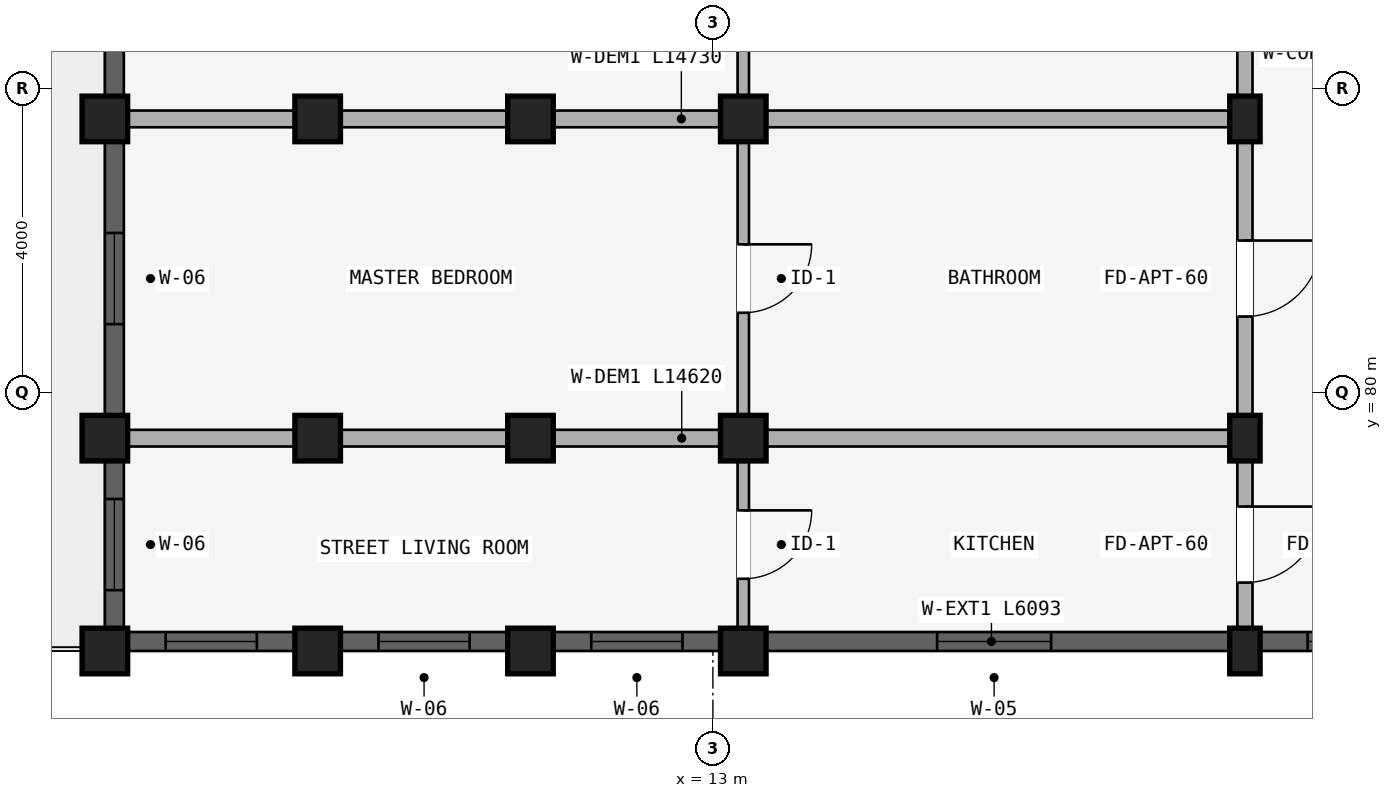
"""IFC4 building model, lengths in metres.
Left out: names, types, materials, properties, quantities, classifications, styles, units other than length and angle.
Written with IfcOpenShell. Run it as: python <this file> out.ifc"""

import sys

from ifc_helpers import new_model, si_unit, direction, frame, frame_2d, origin, origin_2d, place, context, subcontext, project, spatial, rectangle, extrude, element, fill, save


model = new_model("IFC4")
c1 = context("Model", 3, precision=1e-05, world=origin(), true_north=direction((0.0, 1.0)))
c2 = subcontext(c1, "Body", "Model", "MODEL_VIEW")
j1 = project(units=[si_unit("LENGTHUNIT", "METRE"), si_unit("PLANEANGLEUNIT", "RADIAN")], contexts=[c1])
p1 = place(None, origin())
s1 = spatial("IfcSite", under=j1, at=p1, CompositionType="ELEMENT")
p2 = place(p1, origin())
s2 = spatial("IfcBuilding", under=s1, at=p2, CompositionType="ELEMENT")
p3 = place(p2, frame((0.0, 0.0, 40.2)))
s3 = spatial("IfcBuildingStorey", under=s2, at=p3, CompositionType="ELEMENT", Elevation=40.2)
p4 = place(p3, frame((20.0, 83.6, 0.0), z_axis=(0.0, 0.0, 1.0), x_axis=(1.0, 0.0, 0.0)))
e1 = element("IfcColumn", 1, at=p4, inside=s3, PredefinedType="COLUMN", context=c2, shape_type="SweptSolid", body=[
    extrude(rectangle(XDim=0.4, YDim=0.6, at=origin_2d()), origin(), (0.0, 0.0, 1.0), 2.93),
])
for number, where, z_axis, x_axis in (
    (2, (13.4, 83.6, 0.0), (0.0, 0.0, 1.0), (1.0, 0.0, 0.0)),
    (3, (10.6, 83.6, 0.0), (0.0, 0.0, 1.0), (1.0, 0.0, 0.0)),
    (4, (7.8, 83.6, 0.0), (0.0, 0.0, 1.0), (1.0, 0.0, 0.0)),
):
    element("IfcColumn", number, at=place(p3, frame(where, z_axis=z_axis, x_axis=x_axis)), inside=s3, PredefinedType="COLUMN", context=c2, shape_type="SweptSolid", body=[
        extrude(rectangle(XDim=0.6, YDim=0.6, at=origin_2d()), origin(), (0.0, 0.0, 1.0), 2.93),
    ])
p5 = place(p3, frame((5.0, 83.6, 0.0), z_axis=(0.0, 0.0, 1.0), x_axis=(1.0, 0.0, 0.0)))
e5 = element("IfcColumn", 5, at=p5, inside=s3, PredefinedType="COLUMN", context=c2, shape_type="SweptSolid", body=[
    extrude(rectangle(XDim=0.6, YDim=0.6, at=origin_2d()), origin(), (0.0, 0.0, 1.0), 2.97),
])
p6 = place(p3, frame((20.0, 79.4, 0.0), z_axis=(0.0, 0.0, 1.0), x_axis=(1.0, 0.0, 0.0)))
e6 = element("IfcColumn", 6, at=p6, inside=s3, PredefinedType="COLUMN", context=c2, shape_type="SweptSolid", body=[
    extrude(rectangle(XDim=0.4, YDim=0.6, at=origin_2d()), origin(), (0.0, 0.0, 1.0), 2.93),
])
for number, where, z_axis, x_axis in (
    (7, (13.4, 79.4, 0.0), (0.0, 0.0, 1.0), (1.0, 0.0, 0.0)),
    (8, (10.6, 79.4, 0.0), (0.0, 0.0, 1.0), (1.0, 0.0, 0.0)),
    (9, (7.8, 79.4, 0.0), (0.0, 0.0, 1.0), (1.0, 0.0, 0.0)),
):
    element("IfcColumn", number, at=place(p3, frame(where, z_axis=z_axis, x_axis=x_axis)), inside=s3, PredefinedType="COLUMN", context=c2, shape_type="SweptSolid", body=[
        extrude(rectangle(XDim=0.6, YDim=0.6, at=origin_2d()), origin(), (0.0, 0.0, 1.0), 2.93),
    ])
p7 = place(p3, frame((5.0, 79.4, 0.0), z_axis=(0.0, 0.0, 1.0), x_axis=(1.0, 0.0, 0.0)))
e10 = element("IfcColumn", 10, at=p7, inside=s3, PredefinedType="COLUMN", context=c2, shape_type="SweptSolid", body=[
    extrude(rectangle(XDim=0.6, YDim=0.6, at=origin_2d()), origin(), (0.0, 0.0, 1.0), 2.97),
])
p8 = place(p3, frame((20.0, 76.6, 0.0), z_axis=(0.0, 0.0, 1.0), x_axis=(1.0, 0.0, 0.0)))
e11 = element("IfcColumn", 11, at=p8, inside=s3, PredefinedType="COLUMN", context=c2, shape_type="SweptSolid", body=[
    extrude(rectangle(XDim=0.4, YDim=0.6, at=origin_2d()), origin(), (0.0, 0.0, 1.0), 2.93),
])
for number, where, z_axis, x_axis in (
    (12, (13.4, 76.6, 0.0), (0.0, 0.0, 1.0), (1.0, 0.0, 0.0)),
    (13, (10.6, 76.6, 0.0), (0.0, 0.0, 1.0), (1.0, 0.0, 0.0)),
    (14, (7.8, 76.6, 0.0), (0.0, 0.0, 1.0), (1.0, 0.0, 0.0)),
):
    element("IfcColumn", number, at=place(p3, frame(where, z_axis=z_axis, x_axis=x_axis)), inside=s3, PredefinedType="COLUMN", context=c2, shape_type="SweptSolid", body=[
        extrude(rectangle(XDim=0.6, YDim=0.6, at=origin_2d()), origin(), (0.0, 0.0, 1.0), 2.93),
    ])
p9 = place(p3, frame((5.0, 76.6, 0.0), z_axis=(0.0, 0.0, 1.0), x_axis=(1.0, 0.0, 0.0)))
e15 = element("IfcColumn", 15, at=p9, inside=s3, PredefinedType="COLUMN", context=c2, shape_type="SweptSolid", body=[
    extrude(rectangle(XDim=0.6, YDim=0.6, at=origin_2d()), origin(), (0.0, 0.0, 1.0), 2.97),
])
p10 = place(p3, frame((20.0, 87.65, 0.0), z_axis=(0.0, 0.0, 1.0), x_axis=(0.0, -1.0, 0.0)))
e16 = element("IfcWall", 16, at=p10, inside=s3, PredefinedType="STANDARD", context=c2, shape_type="SweptSolid", body=[
    extrude(rectangle(XDim=4.05, YDim=0.2, at=frame_2d((2.025, 0.0))), origin(), (0.0, 0.0, 1.0), 2.372),
])
p11 = place(p10, frame((1.525, 0.0, 0.0)))
e17 = element("IfcOpeningElement", 17, at=p11, cuts=e16, PredefinedType="OPENING", context=c2, shape_type="SweptSolid", body=[
    extrude(rectangle(XDim=1.0, YDim=2.15, at=frame_2d((0.5, 1.075))), frame((0.0, 0.11, 0.0), z_axis=(0.0, -1.0, 0.0), x_axis=(1.0, 0.0, 0.0)), (0.0, 0.0, 1.0), 0.22),
])
p12 = place(p3, frame((13.4, 87.57, 0.0), z_axis=(0.0, 0.0, 1.0), x_axis=(0.0, -1.0, 0.0)))
e18 = element("IfcWall", 18, at=p12, inside=s3, PredefinedType="PARTITIONING", context=c2, shape_type="SweptSolid", body=[
    extrude(rectangle(XDim=3.89, YDim=0.15, at=frame_2d((1.945, 0.0))), origin(), (0.0, 0.0, 1.0), 2.372),
])
p13 = place(p12, frame((1.495, 0.0, 0.0)))
e19 = element("IfcOpeningElement", 19, at=p13, cuts=e18, PredefinedType="OPENING", context=c2, shape_type="SweptSolid", body=[
    extrude(rectangle(XDim=0.9, YDim=2.1, at=frame_2d((0.45, 1.05))), frame((0.0, 0.085, 0.0), z_axis=(0.0, -1.0, 0.0), x_axis=(1.0, 0.0, 0.0)), (0.0, 0.0, 1.0), 0.17),
])
p14 = place(p3, frame((20.0, 83.6, 0.0), z_axis=(0.0, 0.0, 1.0), x_axis=(0.0, -1.0, 0.0)))
e20 = element("IfcWall", 20, at=p14, inside=s3, PredefinedType="STANDARD", context=c2, shape_type="SweptSolid", body=[
    extrude(rectangle(XDim=4.2, YDim=0.2, at=frame_2d((2.1, 0.0))), origin(), (0.0, 0.0, 1.0), 2.372),
])
p15 = place(p14, frame((1.6, 0.0, 0.0)))
e21 = element("IfcOpeningElement", 21, at=p15, cuts=e20, PredefinedType="OPENING", context=c2, shape_type="SweptSolid", body=[
    extrude(rectangle(XDim=1.0, YDim=2.15, at=frame_2d((0.5, 1.075))), frame((0.0, 0.11, 0.0), z_axis=(0.0, -1.0, 0.0), x_axis=(1.0, 0.0, 0.0)), (0.0, 0.0, 1.0), 0.22),
])
p16 = place(p3, frame((13.4, 83.52, 0.0), z_axis=(0.0, 0.0, 1.0), x_axis=(0.0, -1.0, 0.0)))
e22 = element("IfcWall", 22, at=p16, inside=s3, PredefinedType="PARTITIONING", context=c2, shape_type="SweptSolid", body=[
    extrude(rectangle(XDim=4.04, YDim=0.15, at=frame_2d((2.02, 0.0))), origin(), (0.0, 0.0, 1.0), 2.372),
])
p17 = place(p16, frame((1.57, 0.0, 0.0)))
e23 = element("IfcOpeningElement", 23, at=p17, cuts=e22, PredefinedType="OPENING", context=c2, shape_type="SweptSolid", body=[
    extrude(rectangle(XDim=0.9, YDim=2.1, at=frame_2d((0.45, 1.05))), frame((0.0, 0.085, 0.0), z_axis=(0.0, -1.0, 0.0), x_axis=(1.0, 0.0, 0.0)), (0.0, 0.0, 1.0), 0.17),
])
p18 = place(p3, frame((19.95, 83.6, 0.0), z_axis=(0.0, 0.0, 1.0), x_axis=(-1.0, 0.0, 0.0)))
e24 = element("IfcWall", 24, at=p18, inside=s3, PredefinedType="STANDARD", context=c2, shape_type="SweptSolid", body=[
    extrude(rectangle(XDim=14.73, YDim=0.22, at=frame_2d((7.365, 0.0))), origin(), (0.0, 0.0, 1.0), 2.372),
])
p19 = place(p3, frame((20.0, 79.4, 0.0), z_axis=(0.0, 0.0, 1.0), x_axis=(0.0, -1.0, 0.0)))
e25 = element("IfcWall", 25, at=p19, inside=s3, PredefinedType="STANDARD", context=c2, shape_type="SweptSolid", body=[
    extrude(rectangle(XDim=2.8, YDim=0.2, at=frame_2d((1.4, 0.0))), origin(), (0.0, 0.0, 1.0), 2.372),
])
p20 = place(p19, frame((0.9, 0.0, 0.0)))
e26 = element("IfcOpeningElement", 26, at=p20, cuts=e25, PredefinedType="OPENING", context=c2, shape_type="SweptSolid", body=[
    extrude(rectangle(XDim=1.0, YDim=2.15, at=frame_2d((0.5, 1.075))), frame((0.0, 0.11, 0.0), z_axis=(0.0, -1.0, 0.0), x_axis=(1.0, 0.0, 0.0)), (0.0, 0.0, 1.0), 0.22),
])
p21 = place(p3, frame((13.4, 79.32, 0.0), z_axis=(0.0, 0.0, 1.0), x_axis=(0.0, -1.0, 0.0)))
e27 = element("IfcWall", 27, at=p21, inside=s3, PredefinedType="PLUMBINGWALL", context=c2, shape_type="SweptSolid", body=[
    extrude(rectangle(XDim=2.64, YDim=0.15, at=frame_2d((1.32, 0.0))), origin(), (0.0, 0.0, 1.0), 2.372),
])
p22 = place(p21, frame((0.87, 0.0, 0.0)))
e28 = element("IfcOpeningElement", 28, at=p22, cuts=e27, PredefinedType="OPENING", context=c2, shape_type="SweptSolid", body=[
    extrude(rectangle(XDim=0.9, YDim=2.1, at=frame_2d((0.45, 1.05))), frame((0.0, 0.085, 0.0), z_axis=(0.0, -1.0, 0.0), x_axis=(1.0, 0.0, 0.0)), (0.0, 0.0, 1.0), 0.17),
])
p23 = place(p3, frame((19.9, 79.4, 0.0), z_axis=(0.0, 0.0, 1.0), x_axis=(-1.0, 0.0, 0.0)))
e29 = element("IfcWall", 29, at=p23, inside=s3, PredefinedType="STANDARD", context=c2, shape_type="SweptSolid", body=[
    extrude(rectangle(XDim=14.62, YDim=0.22, at=frame_2d((7.31, 0.0))), origin(), (0.0, 0.0, 1.0), 2.372),
])
p24 = place(p3, frame((5.125, 87.497, 0.0), z_axis=(0.0, 0.0, 1.0), x_axis=(0.0, -1.0, 0.0)))
e30 = element("IfcWall", 30, at=p24, inside=s3, PredefinedType="STANDARD", context=c2, shape_type="SweptSolid", body=[
    extrude(rectangle(XDim=3.593, YDim=0.25, at=frame_2d((1.796, 0.0))), origin(), (0.0, 0.0, 1.0), 2.48),
])
p25 = place(p24, frame((1.197, 0.0, 0.78)))
e31 = element("IfcOpeningElement", 31, at=p25, cuts=e30, PredefinedType="OPENING", context=c2, shape_type="SweptSolid", body=[
    extrude(rectangle(XDim=1.2, YDim=1.5, at=frame_2d((0.6, 0.75))), frame((0.0, 0.135, 0.0), z_axis=(0.0, -1.0, 0.0), x_axis=(1.0, 0.0, 0.0)), (0.0, 0.0, 1.0), 0.27),
])
p26 = place(p3, frame((5.125, 83.296, 0.0), z_axis=(0.0, 0.0, 1.0), x_axis=(0.0, -1.0, 0.0)))
e32 = element("IfcWall", 32, at=p26, inside=s3, PredefinedType="STANDARD", context=c2, shape_type="SweptSolid", body=[
    extrude(rectangle(XDim=3.593, YDim=0.25, at=frame_2d((1.796, 0.0))), origin(), (0.0, 0.0, 1.0), 2.48),
])
p27 = place(p26, frame((1.197, 0.0, 0.78)))
e33 = element("IfcOpeningElement", 33, at=p27, cuts=e32, PredefinedType="OPENING", context=c2, shape_type="SweptSolid", body=[
    extrude(rectangle(XDim=1.2, YDim=1.5, at=frame_2d((0.6, 0.75))), frame((0.0, 0.135, 0.0), z_axis=(0.0, -1.0, 0.0), x_axis=(1.0, 0.0, 0.0)), (0.0, 0.0, 1.0), 0.27),
])
p28 = place(p3, frame((5.125, 79.096, 0.0), z_axis=(0.0, 0.0, 1.0), x_axis=(0.0, -1.0, 0.0)))
e34 = element("IfcWall", 34, at=p28, inside=s3, PredefinedType="STANDARD", context=c2, shape_type="SweptSolid", body=[
    extrude(rectangle(XDim=2.193, YDim=0.25, at=frame_2d((1.096, 0.0))), origin(), (0.0, 0.0, 1.0), 2.48),
])
p29 = place(p28, frame((0.497, 0.0, 0.78)))
e35 = element("IfcOpeningElement", 35, at=p29, cuts=e34, PredefinedType="OPENING", context=c2, shape_type="SweptSolid", body=[
    extrude(rectangle(XDim=1.2, YDim=1.5, at=frame_2d((0.6, 0.75))), frame((0.0, 0.135, 0.0), z_axis=(0.0, -1.0, 0.0), x_axis=(1.0, 0.0, 0.0)), (0.0, 0.0, 1.0), 0.27),
])
p30 = place(p3, frame((22.197, 76.725, 0.0), z_axis=(0.0, 0.0, 1.0), x_axis=(-1.0, 0.0, 0.0)))
e36 = element("IfcWall", 36, at=p30, inside=s3, PredefinedType="STANDARD", context=c2, shape_type="SweptSolid", body=[
    extrude(rectangle(XDim=1.993, YDim=0.25, at=frame_2d((0.997, 0.0))), origin(), (0.0, 0.0, 1.0), 2.372),
])
p31 = place(p30, frame((0.622, 0.0, 0.88)))
e37 = element("IfcOpeningElement", 37, at=p31, cuts=e36, PredefinedType="OPENING", context=c2, shape_type="SweptSolid", body=[
    extrude(rectangle(XDim=0.75, YDim=1.05, at=frame_2d((0.375, 0.525))), frame((0.0, 0.135, 0.0), z_axis=(0.0, -1.0, 0.0), x_axis=(1.0, 0.0, 0.0)), (0.0, 0.0, 1.0), 0.27),
])
p32 = place(p3, frame((19.796, 76.725, 0.0), z_axis=(0.0, 0.0, 1.0), x_axis=(-1.0, 0.0, 0.0)))
e38 = element("IfcWall", 38, at=p32, inside=s3, PredefinedType="STANDARD", context=c2, shape_type="SweptSolid", body=[
    extrude(rectangle(XDim=6.093, YDim=0.25, at=frame_2d((3.046, 0.0))), origin(), (0.0, 0.0, 1.0), 2.372),
])
p33 = place(p32, frame((2.346, 0.0, 0.522)))
e39 = element("IfcOpeningElement", 39, at=p33, cuts=e38, PredefinedType="OPENING", context=c2, shape_type="SweptSolid", body=[
    extrude(rectangle(XDim=1.5, YDim=1.65, at=frame_2d((0.75, 0.825))), frame((0.0, 0.135, 0.0), z_axis=(0.0, -1.0, 0.0), x_axis=(1.0, 0.0, 0.0)), (0.0, 0.0, 1.0), 0.27),
])
p34 = place(p3, frame((13.096, 76.725, 0.0), z_axis=(0.0, 0.0, 1.0), x_axis=(-1.0, 0.0, 0.0)))
e40 = element("IfcWall", 40, at=p34, inside=s3, PredefinedType="STANDARD", context=c2, shape_type="SweptSolid", body=[
    extrude(rectangle(XDim=2.193, YDim=0.25, at=frame_2d((1.096, 0.0))), origin(), (0.0, 0.0, 1.0), 2.372),
])
p35 = place(p34, frame((0.497, 0.0, 0.672)))
e41 = element("IfcOpeningElement", 41, at=p35, cuts=e40, PredefinedType="OPENING", context=c2, shape_type="SweptSolid", body=[
    extrude(rectangle(XDim=1.2, YDim=1.5, at=frame_2d((0.6, 0.75))), frame((0.0, 0.135, 0.0), z_axis=(0.0, -1.0, 0.0), x_axis=(1.0, 0.0, 0.0)), (0.0, 0.0, 1.0), 0.27),
])
p36 = place(p3, frame((10.296, 76.725, 0.0), z_axis=(0.0, 0.0, 1.0), x_axis=(-1.0, 0.0, 0.0)))
e42 = element("IfcWall", 42, at=p36, inside=s3, PredefinedType="STANDARD", context=c2, shape_type="SweptSolid", body=[
    extrude(rectangle(XDim=2.193, YDim=0.25, at=frame_2d((1.096, 0.0))), origin(), (0.0, 0.0, 1.0), 2.372),
])
p37 = place(p36, frame((0.497, 0.0, 0.672)))
e43 = element("IfcOpeningElement", 43, at=p37, cuts=e42, PredefinedType="OPENING", context=c2, shape_type="SweptSolid", body=[
    extrude(rectangle(XDim=1.2, YDim=1.5, at=frame_2d((0.6, 0.75))), frame((0.0, 0.135, 0.0), z_axis=(0.0, -1.0, 0.0), x_axis=(1.0, 0.0, 0.0)), (0.0, 0.0, 1.0), 0.27),
])
p38 = place(p3, frame((7.497, 76.725, 0.0), z_axis=(0.0, 0.0, 1.0), x_axis=(-1.0, 0.0, 0.0)))
e44 = element("IfcWall", 44, at=p38, inside=s3, PredefinedType="STANDARD", context=c2, shape_type="SweptSolid", body=[
    extrude(rectangle(XDim=2.193, YDim=0.25, at=frame_2d((1.097, 0.0))), origin(), (0.0, 0.0, 1.0), 2.412),
])
p39 = place(p38, frame((0.497, 0.0, 0.712)))
e45 = element("IfcOpeningElement", 45, at=p39, cuts=e44, PredefinedType="OPENING", context=c2, shape_type="SweptSolid", body=[
    extrude(rectangle(XDim=1.2, YDim=1.5, at=frame_2d((0.6, 0.75))), frame((0.0, 0.135, 0.0), z_axis=(0.0, -1.0, 0.0), x_axis=(1.0, 0.0, 0.0)), (0.0, 0.0, 1.0), 0.27),
])
p40 = place(p27, origin())
e46 = element("IfcWindow", 46, at=p40, inside=s3, PartitioningType="SINGLE_PANEL", PredefinedType="WINDOW", context=c2, shape_type="SweptSolid", body=[
    extrude(rectangle(XDim=1.2, YDim=1.5, at=frame_2d((0.6, 0.75))), frame((0.0, 0.03, 0.0), z_axis=(0.0, -1.0, 0.0), x_axis=(1.0, 0.0, 0.0)), (0.0, 0.0, 1.0), 0.06),
])
fill(e33, e46)
p41 = place(p29, origin())
e47 = element("IfcWindow", 47, at=p41, inside=s3, PartitioningType="SINGLE_PANEL", PredefinedType="WINDOW", context=c2, shape_type="SweptSolid", body=[
    extrude(rectangle(XDim=1.2, YDim=1.5, at=frame_2d((0.6, 0.75))), frame((0.0, 0.03, 0.0), z_axis=(0.0, -1.0, 0.0), x_axis=(1.0, 0.0, 0.0)), (0.0, 0.0, 1.0), 0.06),
])
fill(e35, e47)
p42 = place(p31, origin())
e48 = element("IfcWindow", 48, at=p42, inside=s3, PartitioningType="SINGLE_PANEL", PredefinedType="WINDOW", context=c2, shape_type="SweptSolid", body=[
    extrude(rectangle(XDim=0.75, YDim=1.05, at=frame_2d((0.375, 0.525))), frame((0.0, 0.03, 0.0), z_axis=(0.0, -1.0, 0.0), x_axis=(1.0, 0.0, 0.0)), (0.0, 0.0, 1.0), 0.06),
])
fill(e37, e48)
p43 = place(p33, origin())
e49 = element("IfcWindow", 49, at=p43, inside=s3, PartitioningType="DOUBLE_PANEL_VERTICAL", PredefinedType="WINDOW", context=c2, shape_type="SweptSolid", body=[
    extrude(rectangle(XDim=1.5, YDim=1.65, at=frame_2d((0.75, 0.825))), frame((0.0, 0.03, 0.0), z_axis=(0.0, -1.0, 0.0), x_axis=(1.0, 0.0, 0.0)), (0.0, 0.0, 1.0), 0.06),
])
fill(e39, e49)
p44 = place(p35, origin())
e50 = element("IfcWindow", 50, at=p44, inside=s3, PartitioningType="SINGLE_PANEL", PredefinedType="WINDOW", context=c2, shape_type="SweptSolid", body=[
    extrude(rectangle(XDim=1.2, YDim=1.5, at=frame_2d((0.6, 0.75))), frame((0.0, 0.03, 0.0), z_axis=(0.0, -1.0, 0.0), x_axis=(1.0, 0.0, 0.0)), (0.0, 0.0, 1.0), 0.06),
])
fill(e41, e50)
p45 = place(p37, origin())
e51 = element("IfcWindow", 51, at=p45, inside=s3, PartitioningType="SINGLE_PANEL", PredefinedType="WINDOW", context=c2, shape_type="SweptSolid", body=[
    extrude(rectangle(XDim=1.2, YDim=1.5, at=frame_2d((0.6, 0.75))), frame((0.0, 0.03, 0.0), z_axis=(0.0, -1.0, 0.0), x_axis=(1.0, 0.0, 0.0)), (0.0, 0.0, 1.0), 0.06),
])
fill(e43, e51)
p46 = place(p39, origin())
e52 = element("IfcWindow", 52, at=p46, inside=s3, PartitioningType="SINGLE_PANEL", PredefinedType="WINDOW", context=c2, shape_type="SweptSolid", body=[
    extrude(rectangle(XDim=1.2, YDim=1.5, at=frame_2d((0.6, 0.75))), frame((0.0, 0.03, 0.0), z_axis=(0.0, -1.0, 0.0), x_axis=(1.0, 0.0, 0.0)), (0.0, 0.0, 1.0), 0.06),
])
fill(e45, e52)
p47 = place(p15, origin())
e53 = element("IfcDoor", 53, at=p47, inside=s3, OperationType="SINGLE_SWING_LEFT", PredefinedType="DOOR", context=c2, shape_type="SweptSolid", body=[
    extrude(rectangle(XDim=1.0, YDim=2.15, at=frame_2d((0.5, 1.075))), frame((0.0, 0.025, 0.0), z_axis=(0.0, -1.0, 0.0), x_axis=(1.0, 0.0, 0.0)), (0.0, 0.0, 1.0), 0.05),
])
fill(e21, e53)
p48 = place(p17, frame((0.9, 0.0, 0.0), z_axis=(0.0, 0.0, 1.0), x_axis=(-1.0, 0.0, 0.0)))
e54 = element("IfcDoor", 54, at=p48, inside=s3, OperationType="SINGLE_SWING_RIGHT", PredefinedType="DOOR", context=c2, shape_type="SweptSolid", body=[
    extrude(rectangle(XDim=0.9, YDim=2.1, at=frame_2d((0.45, 1.05))), frame((0.0, 0.025, 0.0), z_axis=(0.0, -1.0, 0.0), x_axis=(1.0, 0.0, 0.0)), (0.0, 0.0, 1.0), 0.05),
])
fill(e23, e54)
p49 = place(p22, frame((0.9, 0.0, 0.0), z_axis=(0.0, 0.0, 1.0), x_axis=(-1.0, 0.0, 0.0)))
e55 = element("IfcDoor", 55, at=p49, inside=s3, OperationType="SINGLE_SWING_RIGHT", PredefinedType="DOOR", context=c2, shape_type="SweptSolid", body=[
    extrude(rectangle(XDim=0.9, YDim=2.1, at=frame_2d((0.45, 1.05))), frame((0.0, 0.025, 0.0), z_axis=(0.0, -1.0, 0.0), x_axis=(1.0, 0.0, 0.0)), (0.0, 0.0, 1.0), 0.05),
])
fill(e28, e55)
p50 = place(p20, origin())
e56 = element("IfcDoor", 56, at=p50, inside=s3, OperationType="SINGLE_SWING_LEFT", PredefinedType="DOOR", context=c2, shape_type="SweptSolid", body=[
    extrude(rectangle(XDim=1.0, YDim=2.15, at=frame_2d((0.5, 1.075))), frame((0.0, 0.025, 0.0), z_axis=(0.0, -1.0, 0.0), x_axis=(1.0, 0.0, 0.0)), (0.0, 0.0, 1.0), 0.05),
])
fill(e26, e56)
save(model, sys.argv[1])
